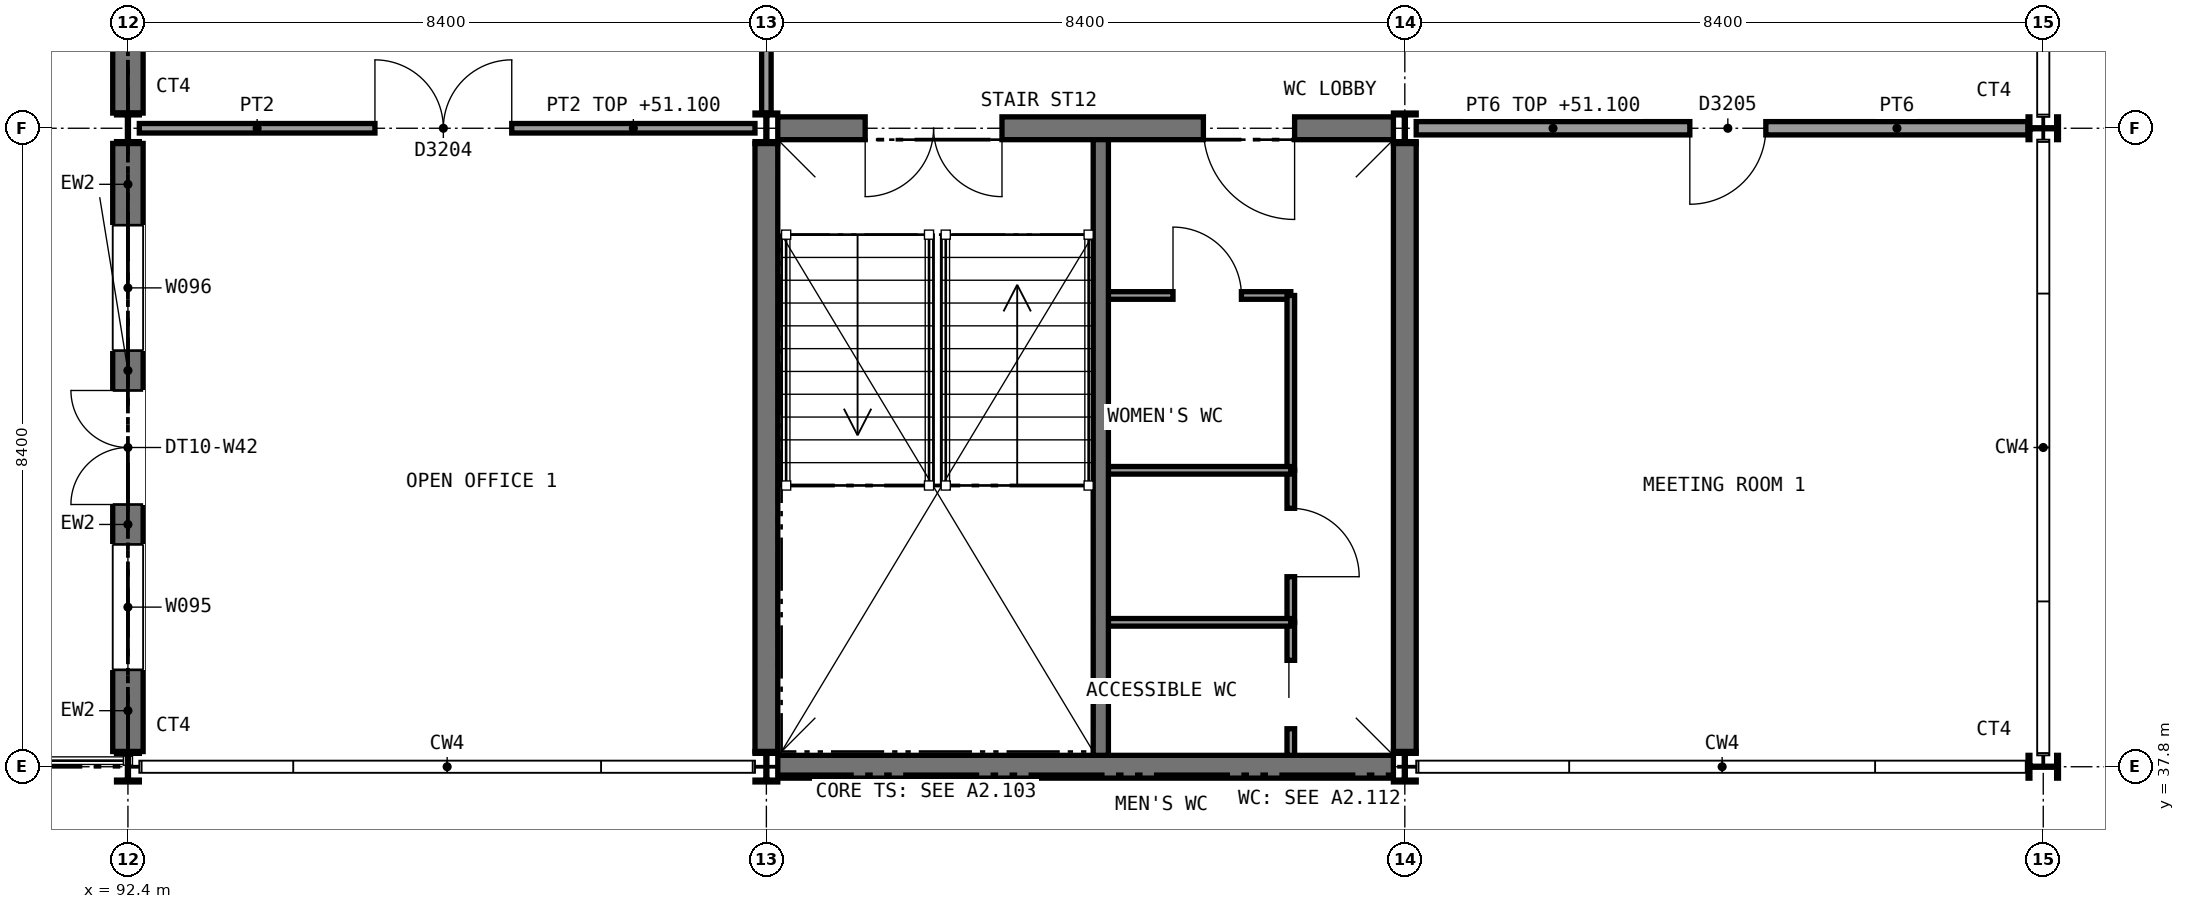
"""IFC4 building model, lengths in metres.
Left out: names, types, materials, properties, quantities, classifications, styles, units other than length and angle.
Written with IfcOpenShell. Run it as: python <this file> out.ifc"""

import sys

from ifc_helpers import new_model, si_unit, direction, frame, frame_2d, origin, origin_2d, place, context, subcontext, project, spatial, rectangle, i_section, extrude, element, fill, save


model = new_model("IFC4")
c1 = context("Model", 3, precision=1e-05, world=origin(), true_north=direction((0.0, 1.0)))
c2 = subcontext(c1, "Body", "Model", "MODEL_VIEW")
j1 = project(units=[si_unit("LENGTHUNIT", "METRE"), si_unit("PLANEANGLEUNIT", "RADIAN")], contexts=[c1])
p1 = place(None, origin())
s1 = spatial("IfcSite", under=j1, at=p1, CompositionType="ELEMENT")
p2 = place(p1, origin())
s2 = spatial("IfcBuilding", under=s1, at=p2, CompositionType="ELEMENT")
p3 = place(p2, frame((0.0, 0.0, 47.6)))
s3 = spatial("IfcBuildingStorey", under=s2, at=p3, CompositionType="ELEMENT", Elevation=47.6)
p4 = place(p3, frame((100.95, 37.8, 0.0), z_axis=(0.0, 0.0, 1.0), x_axis=(1.0, 0.0, 0.0)))
e1 = element("IfcWall", 1, at=p4, inside=s3, PredefinedType="SHEAR", context=c2, shape_type="SweptSolid", body=[
    extrude(rectangle(XDim=8.1, YDim=0.3, at=frame_2d((4.05, 0.0))), origin(), (0.0, 0.0, 1.0), 3.85),
])
p5 = place(p3, frame((100.95, 46.2, 0.0), z_axis=(0.0, 0.0, 1.0), x_axis=(1.0, 0.0, 0.0)))
e2 = element("IfcWall", 2, at=p5, inside=s3, PredefinedType="SHEAR", context=c2, shape_type="SweptSolid", body=[
    extrude(rectangle(XDim=8.1, YDim=0.3, at=frame_2d((4.05, 0.0))), origin(), (0.0, 0.0, 1.0), 3.85),
])
p6 = place(p5, frame((1.15, 0.0, 0.0)))
e3 = element("IfcOpeningElement", 3, at=p6, cuts=e2, PredefinedType="OPENING", context=c2, shape_type="SweptSolid", body=[
    extrude(rectangle(XDim=1.8, YDim=2.1, at=frame_2d((0.9, 1.05))), frame((0.0, 0.16, 0.0), z_axis=(0.0, -1.0, 0.0), x_axis=(1.0, 0.0, 0.0)), (0.0, 0.0, 1.0), 0.32),
])
p7 = place(p5, frame((5.6, 0.0, 0.0)))
e4 = element("IfcOpeningElement", 4, at=p7, cuts=e2, PredefinedType="OPENING", context=c2, shape_type="SweptSolid", body=[
    extrude(rectangle(XDim=1.2, YDim=2.1, at=frame_2d((0.6, 1.05))), frame((0.0, 0.16, 0.0), z_axis=(0.0, -1.0, 0.0), x_axis=(1.0, 0.0, 0.0)), (0.0, 0.0, 1.0), 0.32),
])
for number, where, z_axis, x_axis in (
    (5, (100.8, 38.0, 0.0), (0.0, 0.0, 1.0), (0.0, 1.0, 0.0)),
    (6, (109.2, 38.0, 0.0), (0.0, 0.0, 1.0), (0.0, 1.0, 0.0)),
):
    element("IfcWall", number, at=place(p3, frame(where, z_axis=z_axis, x_axis=x_axis)), inside=s3, PredefinedType="SHEAR", context=c2, shape_type="SweptSolid", body=[
        extrude(rectangle(XDim=8.0, YDim=0.3, at=frame_2d((4.0, 0.0))), origin(), (0.0, 0.0, 1.0), 3.85),
    ])
for number, where, z_axis, x_axis in (
    (7, (92.4, 37.8, 0.0), (0.0, 0.0, 1.0), (1.0, 0.0, 0.0)),
    (8, (92.4, 46.2, 0.0), (0.0, 0.0, 1.0), (1.0, 0.0, 0.0)),
    (9, (100.8, 37.8, 0.0), (0.0, 0.0, 1.0), (1.0, 0.0, 0.0)),
    (10, (100.8, 46.2, 0.0), (0.0, 0.0, 1.0), (1.0, 0.0, 0.0)),
    (11, (109.2, 37.8, 0.0), (0.0, 0.0, 1.0), (1.0, 0.0, 0.0)),
    (12, (109.2, 46.2, 0.0), (0.0, 0.0, 1.0), (1.0, 0.0, 0.0)),
    (13, (117.6, 37.8, 0.0), (0.0, 0.0, 1.0), (0.0, 1.0, 0.0)),
    (14, (117.6, 46.2, 0.0), (0.0, 0.0, 1.0), (0.0, 1.0, 0.0)),
):
    element("IfcColumn", number, at=place(p3, frame(where, z_axis=z_axis, x_axis=x_axis)), inside=s3, PredefinedType="COLUMN", context=c2, shape_type="SweptSolid", body=[
        extrude(i_section(OverallWidth=0.3, OverallDepth=0.4, WebThickness=0.013, FlangeThickness=0.024, FilletRadius=0.027, at=origin_2d()), origin(), (0.0, 0.0, 1.0), 4.0),
    ])
p8 = place(p3, frame((105.3, 44.0, 0.0), z_axis=(0.0, 0.0, 1.0), x_axis=(1.0, 0.0, 0.0)))
e15 = element("IfcWall", 15, at=p8, inside=s3, PredefinedType="PARTITIONING", context=c2, shape_type="SweptSolid", body=[
    extrude(rectangle(XDim=2.4, YDim=0.1, at=frame_2d((1.2, 0.0))), origin(), (0.0, 0.0, 1.0), 3.78),
])
p9 = place(p8, frame((0.85, 0.0, 0.0)))
e16 = element("IfcOpeningElement", 16, at=p9, cuts=e15, PredefinedType="OPENING", context=c2, shape_type="SweptSolid", body=[
    extrude(rectangle(XDim=0.9, YDim=2.1, at=frame_2d((0.45, 1.05))), frame((0.0, 0.06, 0.0), z_axis=(0.0, -1.0, 0.0), x_axis=(1.0, 0.0, 0.0)), (0.0, 0.0, 1.0), 0.12),
])
p10 = place(p3, frame((107.7, 41.7, 0.0), z_axis=(0.0, 0.0, 1.0), x_axis=(0.0, 1.0, 0.0)))
e17 = element("IfcWall", 17, at=p10, inside=s3, PredefinedType="PARTITIONING", context=c2, shape_type="SweptSolid", body=[
    extrude(rectangle(XDim=2.3, YDim=0.1, at=frame_2d((1.15, 0.0))), origin(), (0.0, 0.0, 1.0), 3.78),
])
p11 = place(p3, frame((107.7, 39.7, 0.0), z_axis=(0.0, 0.0, 1.0), x_axis=(0.0, 1.0, 0.0)))
e18 = element("IfcWall", 18, at=p11, inside=s3, PredefinedType="PARTITIONING", context=c2, shape_type="SweptSolid", body=[
    extrude(rectangle(XDim=2.0, YDim=0.1, at=frame_2d((1.0, 0.0))), origin(), (0.0, 0.0, 1.0), 3.78),
])
p12 = place(p11, frame((0.6, 0.0, 0.0)))
e19 = element("IfcOpeningElement", 19, at=p12, cuts=e18, PredefinedType="OPENING", context=c2, shape_type="SweptSolid", body=[
    extrude(rectangle(XDim=0.9, YDim=2.1, at=frame_2d((0.45, 1.05))), frame((0.0, 0.06, 0.0), z_axis=(0.0, -1.0, 0.0), x_axis=(1.0, 0.0, 0.0)), (0.0, 0.0, 1.0), 0.12),
])
p13 = place(p3, frame((107.7, 37.95, 0.0), z_axis=(0.0, 0.0, 1.0), x_axis=(0.0, 1.0, 0.0)))
e20 = element("IfcWall", 20, at=p13, inside=s3, PredefinedType="PARTITIONING", context=c2, shape_type="SweptSolid", body=[
    extrude(rectangle(XDim=1.75, YDim=0.1, at=frame_2d((0.875, 0.0))), origin(), (0.0, 0.0, 1.0), 3.78),
])
p14 = place(p13, frame((0.35, 0.0, 0.0)))
e21 = element("IfcOpeningElement", 21, at=p14, cuts=e20, PredefinedType="OPENING", context=c2, shape_type="SweptSolid", body=[
    extrude(rectangle(XDim=0.9, YDim=2.1, at=frame_2d((0.45, 1.05))), frame((0.0, 0.06, 0.0), z_axis=(0.0, -1.0, 0.0), x_axis=(1.0, 0.0, 0.0)), (0.0, 0.0, 1.0), 0.12),
])
for number, where, z_axis, x_axis in (
    (22, (105.3, 41.7, 0.0), (0.0, 0.0, 1.0), (1.0, 0.0, 0.0)),
    (23, (105.3, 39.7, 0.0), (0.0, 0.0, 1.0), (1.0, 0.0, 0.0)),
):
    element("IfcWall", number, at=place(p3, frame(where, z_axis=z_axis, x_axis=x_axis)), inside=s3, PredefinedType="PARTITIONING", context=c2, shape_type="SweptSolid", body=[
        extrude(rectangle(XDim=2.4, YDim=0.1, at=frame_2d((1.2, 0.0))), origin(), (0.0, 0.0, 1.0), 3.78),
    ])
p15 = place(p3, frame((92.55, 46.2, 0.0), z_axis=(0.0, 0.0, 1.0), x_axis=(1.0, 0.0, 0.0)))
e24 = element("IfcWall", 24, at=p15, inside=s3, PredefinedType="PARTITIONING", context=c2, shape_type="SweptSolid", body=[
    extrude(rectangle(XDim=8.1, YDim=0.125, at=frame_2d((4.05, 0.0))), origin(), (0.0, 0.0, 1.0), 3.5),
])
p16 = place(p15, frame((3.1, 0.0, 0.0)))
e25 = element("IfcOpeningElement", 25, at=p16, cuts=e24, PredefinedType="OPENING", context=c2, shape_type="SweptSolid", body=[
    extrude(rectangle(XDim=1.8, YDim=2.1, at=frame_2d((0.9, 1.05))), frame((0.0, 0.073, 0.0), z_axis=(0.0, -1.0, 0.0), x_axis=(1.0, 0.0, 0.0)), (0.0, 0.0, 1.0), 0.145),
])
p17 = place(p3, frame((109.35, 46.2, 0.0), z_axis=(0.0, 0.0, 1.0), x_axis=(1.0, 0.0, 0.0)))
e26 = element("IfcWall", 26, at=p17, inside=s3, PredefinedType="PARTITIONING", context=c2, shape_type="SweptSolid", body=[
    extrude(rectangle(XDim=8.05, YDim=0.175, at=frame_2d((4.025, 0.0))), origin(), (0.0, 0.0, 1.0), 3.5),
])
p18 = place(p17, frame((3.6, 0.0, 0.0)))
e27 = element("IfcOpeningElement", 27, at=p18, cuts=e26, PredefinedType="OPENING", context=c2, shape_type="SweptSolid", body=[
    extrude(rectangle(XDim=1.0, YDim=2.1, at=frame_2d((0.5, 1.05))), frame((0.0, 0.098, 0.0), z_axis=(0.0, -1.0, 0.0), x_axis=(1.0, 0.0, 0.0)), (0.0, 0.0, 1.0), 0.195),
])
p19 = place(p3, frame((100.8, 46.4, 0.0), z_axis=(0.0, 0.0, 1.0), x_axis=(0.0, 1.0, 0.0)))
e28 = element("IfcWall", 28, at=p19, inside=s3, PredefinedType="PARTITIONING", context=c2, shape_type="SweptSolid", body=[
    extrude(rectangle(XDim=3.1, YDim=0.125, at=frame_2d((1.55, 0.0))), origin(), (0.0, 0.0, 1.0), 3.56),
])
p20 = place(p3, frame((92.4, 38.0, 0.0), z_axis=(0.0, 0.0, 1.0), x_axis=(0.0, 1.0, 0.0)))
e29 = element("IfcWall", 29, at=p20, inside=s3, PredefinedType="STANDARD", context=c2, shape_type="SweptSolid", body=[
    extrude(rectangle(XDim=8.0, YDim=0.4, at=frame_2d((4.0, 0.0))), origin(), (0.0, 0.0, 1.0), 3.85),
])
p21 = place(p20, frame((1.075, 0.0, 0.9)))
e30 = element("IfcOpeningElement", 30, at=p21, cuts=e29, PredefinedType="OPENING", context=c2, shape_type="SweptSolid", body=[
    extrude(rectangle(XDim=1.65, YDim=2.4, at=frame_2d((0.825, 1.2))), frame((0.0, 0.21, 0.0), z_axis=(0.0, -1.0, 0.0), x_axis=(1.0, 0.0, 0.0)), (0.0, 0.0, 1.0), 0.42),
])
p22 = place(p20, frame((5.275, 0.0, 0.9)))
e31 = element("IfcOpeningElement", 31, at=p22, cuts=e29, PredefinedType="OPENING", context=c2, shape_type="SweptSolid", body=[
    extrude(rectangle(XDim=1.65, YDim=2.4, at=frame_2d((0.825, 1.2))), frame((0.0, 0.21, 0.0), z_axis=(0.0, -1.0, 0.0), x_axis=(1.0, 0.0, 0.0)), (0.0, 0.0, 1.0), 0.42),
])
p23 = place(p20, frame((3.25, 0.0, 0.0)))
e32 = element("IfcOpeningElement", 32, at=p23, cuts=e29, PredefinedType="OPENING", context=c2, shape_type="SweptSolid", body=[
    extrude(rectangle(XDim=1.5, YDim=2.4, at=frame_2d((0.75, 1.2))), frame((0.0, 0.21, 0.0), z_axis=(0.0, -1.0, 0.0), x_axis=(1.0, 0.0, 0.0)), (0.0, 0.0, 1.0), 0.42),
])
p24 = place(p3, frame((92.4, 46.4, 0.0), z_axis=(0.0, 0.0, 1.0), x_axis=(0.0, 1.0, 0.0)))
e33 = element("IfcWall", 33, at=p24, inside=s3, PredefinedType="STANDARD", context=c2, shape_type="SweptSolid", body=[
    extrude(rectangle(XDim=8.0, YDim=0.4, at=frame_2d((4.0, 0.0))), origin(), (0.0, 0.0, 1.0), 3.85),
])
p25 = place(p24, frame((5.275, 0.0, 0.9)))
e34 = element("IfcOpeningElement", 34, at=p25, cuts=e33, PredefinedType="OPENING", context=c2, shape_type="SweptSolid", body=[
    extrude(rectangle(XDim=1.65, YDim=2.4, at=frame_2d((0.825, 1.2))), frame((0.0, 0.21, 0.0), z_axis=(0.0, -1.0, 0.0), x_axis=(1.0, 0.0, 0.0)), (0.0, 0.0, 1.0), 0.42),
])
p26 = place(p24, frame((3.25, 0.0, 0.0)))
e35 = element("IfcOpeningElement", 35, at=p26, cuts=e33, PredefinedType="OPENING", context=c2, shape_type="SweptSolid", body=[
    extrude(rectangle(XDim=1.5, YDim=2.4, at=frame_2d((0.75, 1.2))), frame((0.0, 0.21, 0.0), z_axis=(0.0, -1.0, 0.0), x_axis=(1.0, 0.0, 0.0)), (0.0, 0.0, 1.0), 0.42),
])
p27 = place(p3, frame((105.2, 37.95, 0.0), z_axis=(0.0, 0.0, 1.0), x_axis=(0.0, 1.0, 0.0)))
e36 = element("IfcWall", 36, at=p27, inside=s3, PredefinedType="SHEAR", context=c2, shape_type="SweptSolid", body=[
    extrude(rectangle(XDim=8.1, YDim=0.2, at=frame_2d((4.05, 0.0))), origin(), (0.0, 0.0, 1.0), 3.85),
])
p28 = place(p9, origin())
e37 = element("IfcDoor", 37, at=p28, inside=s3, OperationType="SINGLE_SWING_LEFT", PredefinedType="DOOR", context=c2, shape_type="SweptSolid", body=[
    extrude(rectangle(XDim=0.9, YDim=2.1, at=frame_2d((0.45, 1.05))), frame((0.0, 0.025, 0.0), z_axis=(0.0, -1.0, 0.0), x_axis=(1.0, 0.0, 0.0)), (0.0, 0.0, 1.0), 0.05),
])
fill(e16, e37)
p29 = place(p12, frame((0.9, 0.0, 0.0), z_axis=(0.0, 0.0, 1.0), x_axis=(-1.0, 0.0, 0.0)))
e38 = element("IfcDoor", 38, at=p29, inside=s3, OperationType="SINGLE_SWING_RIGHT", PredefinedType="DOOR", context=c2, shape_type="SweptSolid", body=[
    extrude(rectangle(XDim=0.9, YDim=2.1, at=frame_2d((0.45, 1.05))), frame((0.0, 0.025, 0.0), z_axis=(0.0, -1.0, 0.0), x_axis=(1.0, 0.0, 0.0)), (0.0, 0.0, 1.0), 0.05),
])
fill(e19, e38)
p30 = place(p14, origin())
e39 = element("IfcDoor", 39, at=p30, inside=s3, OperationType="SLIDING_TO_RIGHT", PredefinedType="DOOR", context=c2, shape_type="SweptSolid", body=[
    extrude(rectangle(XDim=0.9, YDim=2.1, at=frame_2d((0.45, 1.05))), frame((0.0, 0.025, 0.0), z_axis=(0.0, -1.0, 0.0), x_axis=(1.0, 0.0, 0.0)), (0.0, 0.0, 1.0), 0.05),
])
fill(e21, e39)
p31 = place(p16, origin())
e40 = element("IfcDoor", 40, at=p31, inside=s3, OperationType="DOUBLE_DOOR_SINGLE_SWING", PredefinedType="DOOR", context=c2, shape_type="SweptSolid", body=[
    extrude(rectangle(XDim=1.8, YDim=2.1, at=frame_2d((0.9, 1.05))), frame((0.0, 0.025, 0.0), z_axis=(0.0, -1.0, 0.0), x_axis=(1.0, 0.0, 0.0)), (0.0, 0.0, 1.0), 0.05),
])
fill(e25, e40)
p32 = place(p18, frame((1.0, 0.0, 0.0), z_axis=(0.0, 0.0, 1.0), x_axis=(-1.0, 0.0, 0.0)))
e41 = element("IfcDoor", 41, at=p32, inside=s3, OperationType="SINGLE_SWING_RIGHT", PredefinedType="DOOR", context=c2, shape_type="SweptSolid", body=[
    extrude(rectangle(XDim=1.0, YDim=2.1, at=frame_2d((0.5, 1.05))), frame((0.0, 0.025, 0.0), z_axis=(0.0, -1.0, 0.0), x_axis=(1.0, 0.0, 0.0)), (0.0, 0.0, 1.0), 0.05),
])
fill(e27, e41)
p33 = place(p21, origin())
e42 = element("IfcWindow", 42, at=p33, inside=s3, PartitioningType="SINGLE_PANEL", PredefinedType="WINDOW", context=c2, shape_type="SweptSolid", body=[
    extrude(rectangle(XDim=1.65, YDim=2.4, at=frame_2d((0.825, 1.2))), frame((0.0, 0.03, 0.0), z_axis=(0.0, -1.0, 0.0), x_axis=(1.0, 0.0, 0.0)), (0.0, 0.0, 1.0), 0.06),
])
fill(e30, e42)
p34 = place(p22, origin())
e43 = element("IfcWindow", 43, at=p34, inside=s3, PartitioningType="SINGLE_PANEL", PredefinedType="WINDOW", context=c2, shape_type="SweptSolid", body=[
    extrude(rectangle(XDim=1.65, YDim=2.4, at=frame_2d((0.825, 1.2))), frame((0.0, 0.03, 0.0), z_axis=(0.0, -1.0, 0.0), x_axis=(1.0, 0.0, 0.0)), (0.0, 0.0, 1.0), 0.06),
])
fill(e31, e43)
p35 = place(p23, origin())
e44 = element("IfcDoor", 44, at=p35, inside=s3, OperationType="DOUBLE_DOOR_SINGLE_SWING", PredefinedType="DOOR", context=c2, shape_type="SweptSolid", body=[
    extrude(rectangle(XDim=1.5, YDim=2.4, at=frame_2d((0.75, 1.2))), frame((0.0, 0.025, 0.0), z_axis=(0.0, -1.0, 0.0), x_axis=(1.0, 0.0, 0.0)), (0.0, 0.0, 1.0), 0.05),
])
fill(e32, e44)
p36 = place(p6, frame((1.8, 0.0, 0.0), z_axis=(0.0, 0.0, 1.0), x_axis=(-1.0, 0.0, 0.0)))
e45 = element("IfcDoor", 45, at=p36, inside=s3, OperationType="DOUBLE_DOOR_SINGLE_SWING", PredefinedType="DOOR", context=c2, shape_type="SweptSolid", body=[
    extrude(rectangle(XDim=1.8, YDim=2.1, at=frame_2d((0.9, 1.05))), frame((0.0, 0.025, 0.0), z_axis=(0.0, -1.0, 0.0), x_axis=(1.0, 0.0, 0.0)), (0.0, 0.0, 1.0), 0.05),
])
fill(e3, e45)
p37 = place(p7, frame((1.2, 0.0, 0.0), z_axis=(0.0, 0.0, 1.0), x_axis=(-1.0, 0.0, 0.0)))
e46 = element("IfcDoor", 46, at=p37, inside=s3, OperationType="SINGLE_SWING_LEFT", PredefinedType="DOOR", context=c2, shape_type="SweptSolid", body=[
    extrude(rectangle(XDim=1.2, YDim=2.1, at=frame_2d((0.6, 1.05))), frame((0.0, 0.025, 0.0), z_axis=(0.0, -1.0, 0.0), x_axis=(1.0, 0.0, 0.0)), (0.0, 0.0, 1.0), 0.05),
])
fill(e4, e46)
save(model, sys.argv[1])
